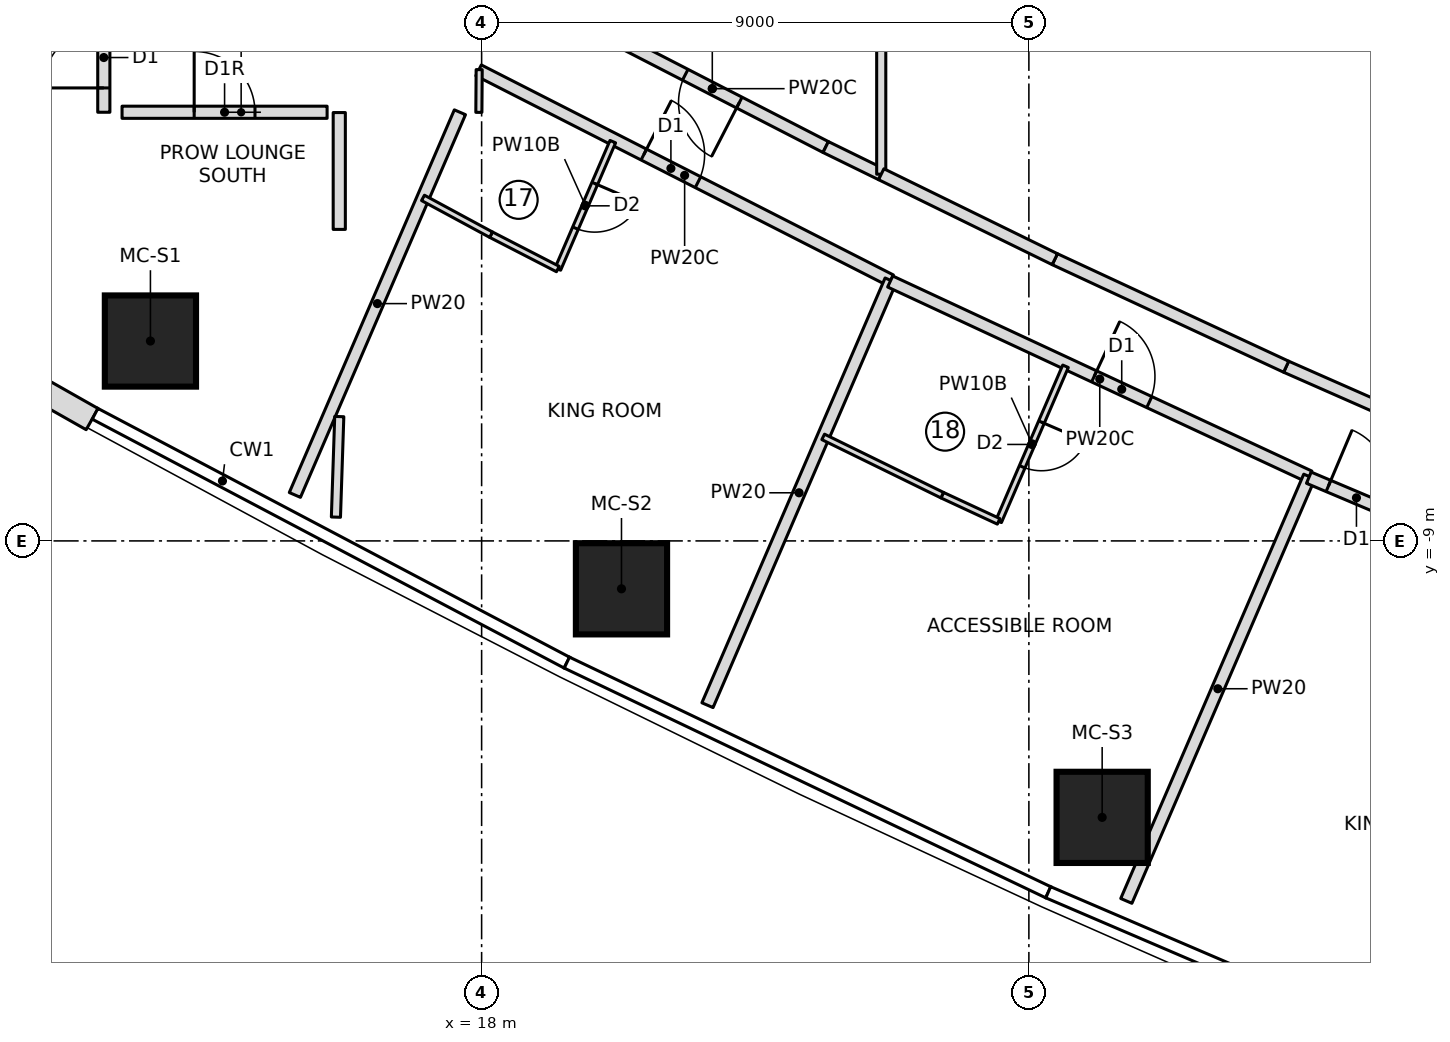
"""IFC4 building model, lengths in metres.
Left out: names, types, materials, properties, quantities, classifications, styles, units other than length and angle.
Written with IfcOpenShell. Run it as: python <this file> out.ifc"""

import sys

from ifc_helpers import new_model, si_unit, direction, frame, frame_2d, origin, origin_2d, place, context, subcontext, project, spatial, polyline, rectangle, outline, extrude, element, fill, save


model = new_model("IFC4")
c1 = context("Model", 3, precision=1e-05, world=origin(), true_north=direction((0.0, 1.0)))
c2 = subcontext(c1, "Body", "Model", "MODEL_VIEW")
j1 = project(units=[si_unit("LENGTHUNIT", "METRE"), si_unit("PLANEANGLEUNIT", "RADIAN")], contexts=[c1])
p1 = place(None, origin())
s1 = spatial("IfcSite", under=j1, at=p1, CompositionType="ELEMENT")
p2 = place(p1, origin())
s2 = spatial("IfcBuilding", under=s1, at=p2, CompositionType="ELEMENT")
p3 = place(p2, frame((0.0, 0.0, 158.6)))
s3 = spatial("IfcBuildingStorey", under=s2, at=p3, CompositionType="ELEMENT", Elevation=158.6)
for number, where, z_axis, x_axis in (
    (1, (12.553, -5.713, 0.0), (0.0, 0.0, 1.0), (1.0, 0.0, 0.0)),
    (2, (20.3, -9.788, 0.0), (0.0, 0.0, 1.0), (1.0, 0.0, 0.0)),
    (3, (28.205, -13.547, 0.0), (0.0, 0.0, 1.0), (1.0, 0.0, 0.0)),
):
    element("IfcColumn", number, at=place(p3, frame(where, z_axis=z_axis, x_axis=x_axis)), inside=s3, PredefinedType="COLUMN", context=c2, shape_type="SweptSolid", body=[
        extrude(rectangle(XDim=1.5, YDim=1.5, at=origin_2d()), origin(), (0.0, 0.0, 1.0), 3.55),
    ])
p4 = place(p3, frame((7.777, -4.834, 0.0), z_axis=(0.0, 0.0, 1.0), x_axis=(0.870045255208, -0.492971859125, 0.0)))
e4 = element("IfcWall", 4, at=p4, inside=s3, PredefinedType="NOTDEFINED", context=c2, shape_type="SweptSolid", body=[
    extrude(outline(polyline([(-0.036, -0.2), (4.388, -0.2), (4.388, 0.2), (0.036, 0.2), (-0.036, -0.2)])), origin(), (0.0, 0.0, 1.0), 3.25),
])
p5 = place(p4, frame((1.094, 0.0, 0.6)))
e5 = element("IfcOpeningElement", 5, at=p5, cuts=e4, PredefinedType="OPENING", context=c2, shape_type="SweptSolid", body=[
    extrude(outline(polyline([(0.0, 1.35), (0.084, 1.771), (0.322, 2.128), (0.679, 2.366), (1.1, 2.45), (1.521, 2.366), (1.878, 2.128), (2.116, 1.771), (2.2, 1.35), (2.2, 1.1), (2.116, 0.679), (1.878, 0.322), (1.521, 0.084), (1.1, 0.0), (0.679, 0.084), (0.322, 0.322), (0.084, 0.679), (0.0, 1.1), (0.0, 1.35)])), frame((0.0, 0.21, 0.0), z_axis=(0.0, -1.0, 0.0), x_axis=(1.0, 0.0, 0.0)), (0.0, 0.0, 1.0), 0.42),
])
p6 = place(p3, frame((12.087, -1.95, 0.0), z_axis=(0.0, 0.0, 1.0), x_axis=(1.0, 0.0, 0.0)))
e6 = element("IfcWall", 6, at=p6, inside=s3, PredefinedType="PARTITIONING", context=c2, shape_type="SweptSolid", body=[
    extrude(rectangle(XDim=3.372, YDim=0.2, at=frame_2d((1.686, 0.0))), origin(), (0.0, 0.0, 1.0), 3.25),
])
p7 = place(p6, frame((1.186, 0.0, 0.0)))
e7 = element("IfcOpeningElement", 7, at=p7, cuts=e6, PredefinedType="OPENING", context=c2, shape_type="SweptSolid", body=[
    extrude(rectangle(XDim=1.0, YDim=2.1, at=frame_2d((0.5, 1.05))), frame((0.0, 0.11, 0.0), z_axis=(0.0, -1.0, 0.0), x_axis=(1.0, 0.0, 0.0)), (0.0, 0.0, 1.0), 0.22),
])
p8 = place(p3, frame((11.787, -1.95, 0.0), z_axis=(0.0, 0.0, 1.0), x_axis=(0.0, 1.0, 0.0)))
e8 = element("IfcWall", 8, at=p8, inside=s3, PredefinedType="PARTITIONING", context=c2, shape_type="SweptSolid", body=[
    extrude(rectangle(XDim=3.9, YDim=0.2, at=frame_2d((1.95, 0.0))), origin(), (0.0, 0.0, 1.0), 3.25),
])
p9 = place(p8, frame((0.4, 0.0, 0.0)))
e9 = element("IfcOpeningElement", 9, at=p9, cuts=e8, PredefinedType="OPENING", context=c2, shape_type="SweptSolid", body=[
    extrude(rectangle(XDim=1.0, YDim=2.1, at=frame_2d((0.5, 1.05))), frame((0.0, 0.11, 0.0), z_axis=(0.0, -1.0, 0.0), x_axis=(1.0, 0.0, 0.0)), (0.0, 0.0, 1.0), 0.22),
])
p10 = place(p3, frame((14.929, -8.244, 0.0), z_axis=(0.0, 0.0, 1.0), x_axis=(0.395994543879, 0.918252863441, 0.0)))
e10 = element("IfcWall", 10, at=p10, inside=s3, PredefinedType="PARTITIONING", context=c2, shape_type="SweptSolid", body=[
    extrude(rectangle(XDim=6.854, YDim=0.2, at=frame_2d((3.427, 0.0))), origin(), (0.0, 0.0, 1.0), 3.25),
])
p11 = place(p3, frame((17.95, -1.261, 0.0), z_axis=(0.0, 0.0, 1.0), x_axis=(0.890940521951, -0.454120013152, 0.0)))
e11 = element("IfcWall", 11, at=p11, inside=s3, PredefinedType="PARTITIONING", context=c2, shape_type="SweptSolid", body=[
    extrude(rectangle(XDim=7.607, YDim=0.2, at=frame_2d((3.803, 0.0))), origin(), (0.0, 0.0, 1.0), 3.25),
])
p12 = place(p11, frame((3.05, 0.0, 0.0)))
e12 = element("IfcOpeningElement", 12, at=p12, cuts=e11, PredefinedType="OPENING", context=c2, shape_type="SweptSolid", body=[
    extrude(rectangle(XDim=1.0, YDim=2.1, at=frame_2d((0.5, 1.05))), frame((0.0, 0.11, 0.0), z_axis=(0.0, -1.0, 0.0), x_axis=(1.0, 0.0, 0.0)), (0.0, 0.0, 1.0), 0.22),
])
p13 = place(p3, frame((20.157, -2.433, 0.0), z_axis=(0.0, 0.0, 1.0), x_axis=(-0.395958457437, -0.9182684248, 0.0)))
e13 = element("IfcWall", 13, at=p13, inside=s3, PredefinedType="PARTITIONING", context=c2, shape_type="SweptSolid", body=[
    extrude(rectangle(XDim=2.282, YDim=0.1, at=frame_2d((1.141, 0.0))), origin(), (0.0, 0.0, 1.0), 3.25),
])
p14 = place(p13, frame((0.75, 0.0, 0.0)))
e14 = element("IfcOpeningElement", 14, at=p14, cuts=e13, PredefinedType="OPENING", context=c2, shape_type="SweptSolid", body=[
    extrude(rectangle(XDim=0.8, YDim=2.1, at=frame_2d((0.4, 1.05))), frame((0.0, 0.06, 0.0), z_axis=(0.0, -1.0, 0.0), x_axis=(1.0, 0.0, 0.0)), (0.0, 0.0, 1.0), 0.12),
])
p15 = place(p3, frame((19.253, -4.529, 0.0), z_axis=(0.0, 0.0, 1.0), x_axis=(-0.889106231322, 0.457700895154, 0.0)))
e15 = element("IfcWall", 15, at=p15, inside=s3, PredefinedType="PARTITIONING", context=c2, shape_type="SweptSolid", body=[
    extrude(rectangle(XDim=1.235, YDim=0.1, at=frame_2d((0.617, 0.0))), origin(), (0.0, 0.0, 1.0), 3.25),
])
p16 = place(p3, frame((18.156, -3.963, 0.0), z_axis=(0.0, 0.0, 1.0), x_axis=(-0.879823588489, 0.475300382009, 0.0)))
e16 = element("IfcWall", 16, at=p16, inside=s3, PredefinedType="PARTITIONING", context=c2, shape_type="SweptSolid", body=[
    extrude(rectangle(XDim=1.273, YDim=0.1, at=frame_2d((0.636, 0.0))), origin(), (0.0, 0.0, 1.0), 3.25),
])
p17 = place(p3, frame((21.714, -11.702, 0.0), z_axis=(0.0, 0.0, 1.0), x_axis=(0.395982367396, 0.918258114427, 0.0)))
e17 = element("IfcWall", 17, at=p17, inside=s3, PredefinedType="PARTITIONING", context=c2, shape_type="SweptSolid", body=[
    extrude(rectangle(XDim=7.609, YDim=0.2, at=frame_2d((3.804, 0.0))), origin(), (0.0, 0.0, 1.0), 3.25),
])
p18 = place(p3, frame((24.719, -4.733, 0.0), z_axis=(0.0, 0.0, 1.0), x_axis=(0.906593711122, -0.422004553238, 0.0)))
e18 = element("IfcWall", 18, at=p18, inside=s3, PredefinedType="PARTITIONING", context=c2, shape_type="SweptSolid", body=[
    extrude(rectangle(XDim=7.603, YDim=0.2, at=frame_2d((3.802, 0.0))), origin(), (0.0, 0.0, 1.0), 3.25),
])
p19 = place(p18, frame((3.7, 0.0, 0.0)))
e19 = element("IfcOpeningElement", 19, at=p19, cuts=e18, PredefinedType="OPENING", context=c2, shape_type="SweptSolid", body=[
    extrude(rectangle(XDim=1.0, YDim=2.1, at=frame_2d((0.5, 1.05))), frame((0.0, 0.11, 0.0), z_axis=(0.0, -1.0, 0.0), x_axis=(1.0, 0.0, 0.0)), (0.0, 0.0, 1.0), 0.22),
])
p20 = place(p3, frame((27.603, -6.128, 0.0), z_axis=(0.0, 0.0, 1.0), x_axis=(-0.396018464604, -0.918242547311, 0.0)))
e20 = element("IfcWall", 20, at=p20, inside=s3, PredefinedType="PARTITIONING", context=c2, shape_type="SweptSolid", body=[
    extrude(rectangle(XDim=2.778, YDim=0.1, at=frame_2d((1.389, 0.0))), origin(), (0.0, 0.0, 1.0), 3.25),
])
p21 = place(p20, frame((1.0, 0.0, 0.0)))
e21 = element("IfcOpeningElement", 21, at=p21, cuts=e20, PredefinedType="OPENING", context=c2, shape_type="SweptSolid", body=[
    extrude(rectangle(XDim=0.8, YDim=2.1, at=frame_2d((0.4, 1.05))), frame((0.0, 0.06, 0.0), z_axis=(0.0, -1.0, 0.0), x_axis=(1.0, 0.0, 0.0)), (0.0, 0.0, 1.0), 0.12),
])
p22 = place(p3, frame((26.503, -8.679, 0.0), z_axis=(0.0, 0.0, 1.0), x_axis=(-0.906901476145, 0.421342749512, 0.0)))
e22 = element("IfcWall", 22, at=p22, inside=s3, PredefinedType="PARTITIONING", context=c2, shape_type="SweptSolid", body=[
    extrude(rectangle(XDim=1.023, YDim=0.1, at=frame_2d((0.511, 0.0))), origin(), (0.0, 0.0, 1.0), 3.25),
])
p23 = place(p3, frame((25.575, -8.248, 0.0), z_axis=(0.0, 0.0, 1.0), x_axis=(-0.898158387811, 0.439672048696, 0.0)))
e23 = element("IfcWall", 23, at=p23, inside=s3, PredefinedType="PARTITIONING", context=c2, shape_type="SweptSolid", body=[
    extrude(rectangle(XDim=2.18, YDim=0.1, at=frame_2d((1.09, 0.0))), origin(), (0.0, 0.0, 1.0), 3.25),
])
p24 = place(p3, frame((28.603, -14.921, 0.0), z_axis=(0.0, 0.0, 1.0), x_axis=(0.395976934703, 0.91826045716, 0.0)))
e24 = element("IfcWall", 24, at=p24, inside=s3, PredefinedType="PARTITIONING", context=c2, shape_type="SweptSolid", body=[
    extrude(rectangle(XDim=7.6, YDim=0.2, at=frame_2d((3.8, 0.0))), origin(), (0.0, 0.0, 1.0), 3.25),
])
p25 = place(p3, frame((31.604, -7.96, 0.0), z_axis=(0.0, 0.0, 1.0), x_axis=(0.921069634751, -0.389397904386, 0.0)))
e25 = element("IfcWall", 25, at=p25, inside=s3, PredefinedType="PARTITIONING", context=c2, shape_type="SweptSolid", body=[
    extrude(rectangle(XDim=7.6, YDim=0.2, at=frame_2d((3.8, 0.0))), origin(), (0.0, 0.0, 1.0), 3.25),
])
p26 = place(p25, frame((0.35, 0.0, 0.0)))
e26 = element("IfcOpeningElement", 26, at=p26, cuts=e25, PredefinedType="OPENING", context=c2, shape_type="SweptSolid", body=[
    extrude(rectangle(XDim=1.0, YDim=2.1, at=frame_2d((0.5, 1.05))), frame((0.0, 0.11, 0.0), z_axis=(0.0, -1.0, 0.0), x_axis=(1.0, 0.0, 0.0)), (0.0, 0.0, 1.0), 0.22),
])
p27 = place(p3, frame((23.659, -2.522, 0.0), z_axis=(0.0, 0.0, 1.0), x_axis=(-0.889140337289, 0.457634636589, 0.0)))
e27 = element("IfcWall", 27, at=p27, inside=s3, PredefinedType="PARTITIONING", context=c2, shape_type="SweptSolid", body=[
    extrude(rectangle(XDim=4.195, YDim=0.2, at=frame_2d((2.098, 0.0))), origin(), (0.0, 0.0, 1.0), 3.25),
])
p28 = place(p27, frame((1.598, 0.0, 0.0)))
e28 = element("IfcOpeningElement", 28, at=p28, cuts=e27, PredefinedType="OPENING", context=c2, shape_type="SweptSolid", body=[
    extrude(rectangle(XDim=1.0, YDim=2.1, at=frame_2d((0.5, 1.05))), frame((0.0, 0.11, 0.0), z_axis=(0.0, -1.0, 0.0), x_axis=(1.0, 0.0, 0.0)), (0.0, 0.0, 1.0), 0.22),
])
p29 = place(p3, frame((24.572, -2.969, 0.0), z_axis=(0.0, 0.0, 1.0), x_axis=(-0.898188484258, 0.439610562597, 0.0)))
e29 = element("IfcWall", 29, at=p29, inside=s3, PredefinedType="PARTITIONING", context=c2, shape_type="SweptSolid", body=[
    extrude(rectangle(XDim=1.017, YDim=0.2, at=frame_2d((0.508, 0.0))), origin(), (0.0, 0.0, 1.0), 3.25),
])
p30 = place(p3, frame((24.572, -2.969, 0.0), z_axis=(0.0, 0.0, 1.0), x_axis=(0.0, 1.0, 0.0)))
e30 = element("IfcWall", 30, at=p30, inside=s3, PredefinedType="PARTITIONING", context=c2, shape_type="SweptSolid", body=[
    extrude(rectangle(XDim=5.938, YDim=0.15, at=frame_2d((2.969, 0.0))), origin(), (0.0, 0.0, 1.0), 3.25),
])
p31 = place(p3, frame((33.308, -7.05, 0.0), z_axis=(0.0, 0.0, 1.0), x_axis=(-0.915102334452, 0.403221672881, 0.0)))
e31 = element("IfcWall", 31, at=p31, inside=s3, PredefinedType="PARTITIONING", context=c2, shape_type="SweptSolid", body=[
    extrude(rectangle(XDim=2.269, YDim=0.2, at=frame_2d((1.135, 0.0))), origin(), (0.0, 0.0, 1.0), 3.25),
])
p32 = place(p3, frame((31.231, -6.135, 0.0), z_axis=(0.0, 0.0, 1.0), x_axis=(-0.906830275285, 0.421495968933, 0.0)))
e32 = element("IfcWall", 32, at=p32, inside=s3, PredefinedType="PARTITIONING", context=c2, shape_type="SweptSolid", body=[
    extrude(rectangle(XDim=4.195, YDim=0.2, at=frame_2d((2.098, 0.0))), origin(), (0.0, 0.0, 1.0), 3.25),
])
p33 = place(p3, frame((27.427, -4.367, 0.0), z_axis=(0.0, 0.0, 1.0), x_axis=(-0.898128954367, 0.439732169995, 0.0)))
e33 = element("IfcWall", 33, at=p33, inside=s3, PredefinedType="PARTITIONING", context=c2, shape_type="SweptSolid", body=[
    extrude(rectangle(XDim=3.178, YDim=0.2, at=frame_2d((1.589, 0.0))), origin(), (0.0, 0.0, 1.0), 3.25),
])
p34 = place(p3, frame((15.659, -6.955, 0.0), z_axis=(0.0, 0.0, 1.0), x_axis=(-0.033196927484, -0.999448830109, 0.0)))
e34 = element("IfcWall", 34, at=p34, inside=s3, PredefinedType="PARTITIONING", context=c2, shape_type="SweptSolid", body=[
    extrude(rectangle(XDim=1.655, YDim=0.15, at=frame_2d((0.827, 0.0))), origin(), (0.0, 0.0, 1.0), 3.25),
])
p35 = place(p3, frame((17.955, -1.952, 0.0), z_axis=(0.0, 0.0, 1.0), x_axis=(0.007291472831, 0.999973416859, 0.0)))
e35 = element("IfcWall", 35, at=p35, inside=s3, PredefinedType="PARTITIONING", context=c2, shape_type="SweptSolid", body=[
    extrude(rectangle(XDim=0.703, YDim=0.1, at=frame_2d((0.352, 0.0))), origin(), (0.0, 0.0, 1.0), 3.25),
])
p36 = place(p3, frame((15.659, -1.955, 0.0), z_axis=(0.0, 0.0, 1.0), x_axis=(0.0, -1.0, 0.0)))
e36 = element("IfcWall", 36, at=p36, inside=s3, PredefinedType="PARTITIONING", context=c2, shape_type="SweptSolid", body=[
    extrude(rectangle(XDim=1.922, YDim=0.2, at=frame_2d((0.961, 0.0))), origin(), (0.0, 0.0, 1.0), 3.25),
])
p37 = place(p7, origin())
e37 = element("IfcDoor", 37, at=p37, inside=s3, OperationType="SINGLE_SWING_RIGHT", PredefinedType="DOOR", context=c2, shape_type="SweptSolid", body=[
    extrude(rectangle(XDim=1.0, YDim=2.1, at=frame_2d((0.5, 1.05))), frame((0.0, 0.025, 0.0), z_axis=(0.0, -1.0, 0.0), x_axis=(1.0, 0.0, 0.0)), (0.0, 0.0, 1.0), 0.05),
])
fill(e7, e37)
p38 = place(p9, origin())
e38 = element("IfcDoor", 38, at=p38, inside=s3, OperationType="SINGLE_SWING_LEFT", PredefinedType="DOOR", context=c2, shape_type="SweptSolid", body=[
    extrude(rectangle(XDim=1.0, YDim=2.1, at=frame_2d((0.5, 1.05))), frame((0.0, 0.025, 0.0), z_axis=(0.0, -1.0, 0.0), x_axis=(1.0, 0.0, 0.0)), (0.0, 0.0, 1.0), 0.05),
])
fill(e9, e38)
p39 = place(p14, origin())
e39 = element("IfcDoor", 39, at=p39, inside=s3, OperationType="SINGLE_SWING_LEFT", PredefinedType="DOOR", context=c2, shape_type="SweptSolid", body=[
    extrude(rectangle(XDim=0.8, YDim=2.1, at=frame_2d((0.4, 1.05))), frame((0.0, 0.025, 0.0), z_axis=(0.0, -1.0, 0.0), x_axis=(1.0, 0.0, 0.0)), (0.0, 0.0, 1.0), 0.05),
])
fill(e14, e39)
p40 = place(p12, origin())
e40 = element("IfcDoor", 40, at=p40, inside=s3, OperationType="SINGLE_SWING_LEFT", PredefinedType="DOOR", context=c2, shape_type="SweptSolid", body=[
    extrude(rectangle(XDim=1.0, YDim=2.1, at=frame_2d((0.5, 1.05))), frame((0.0, 0.025, 0.0), z_axis=(0.0, -1.0, 0.0), x_axis=(1.0, 0.0, 0.0)), (0.0, 0.0, 1.0), 0.05),
])
fill(e12, e40)
p41 = place(p21, origin())
e41 = element("IfcDoor", 41, at=p41, inside=s3, OperationType="SINGLE_SWING_LEFT", PredefinedType="DOOR", context=c2, shape_type="SweptSolid", body=[
    extrude(rectangle(XDim=0.8, YDim=2.1, at=frame_2d((0.4, 1.05))), frame((0.0, 0.025, 0.0), z_axis=(0.0, -1.0, 0.0), x_axis=(1.0, 0.0, 0.0)), (0.0, 0.0, 1.0), 0.05),
])
fill(e21, e41)
p42 = place(p19, origin())
e42 = element("IfcDoor", 42, at=p42, inside=s3, OperationType="SINGLE_SWING_LEFT", PredefinedType="DOOR", context=c2, shape_type="SweptSolid", body=[
    extrude(rectangle(XDim=1.0, YDim=2.1, at=frame_2d((0.5, 1.05))), frame((0.0, 0.025, 0.0), z_axis=(0.0, -1.0, 0.0), x_axis=(1.0, 0.0, 0.0)), (0.0, 0.0, 1.0), 0.05),
])
fill(e19, e42)
p43 = place(p26, origin())
e43 = element("IfcDoor", 43, at=p43, inside=s3, OperationType="SINGLE_SWING_LEFT", PredefinedType="DOOR", context=c2, shape_type="SweptSolid", body=[
    extrude(rectangle(XDim=1.0, YDim=2.1, at=frame_2d((0.5, 1.05))), frame((0.0, 0.025, 0.0), z_axis=(0.0, -1.0, 0.0), x_axis=(1.0, 0.0, 0.0)), (0.0, 0.0, 1.0), 0.05),
])
fill(e26, e43)
p44 = place(p28, origin())
e44 = element("IfcDoor", 44, at=p44, inside=s3, OperationType="SINGLE_SWING_RIGHT", PredefinedType="DOOR", context=c2, shape_type="SweptSolid", body=[
    extrude(rectangle(XDim=1.0, YDim=2.1, at=frame_2d((0.5, 1.05))), frame((0.0, 0.025, 0.0), z_axis=(0.0, -1.0, 0.0), x_axis=(1.0, 0.0, 0.0)), (0.0, 0.0, 1.0), 0.05),
])
fill(e28, e44)
save(model, sys.argv[1])
